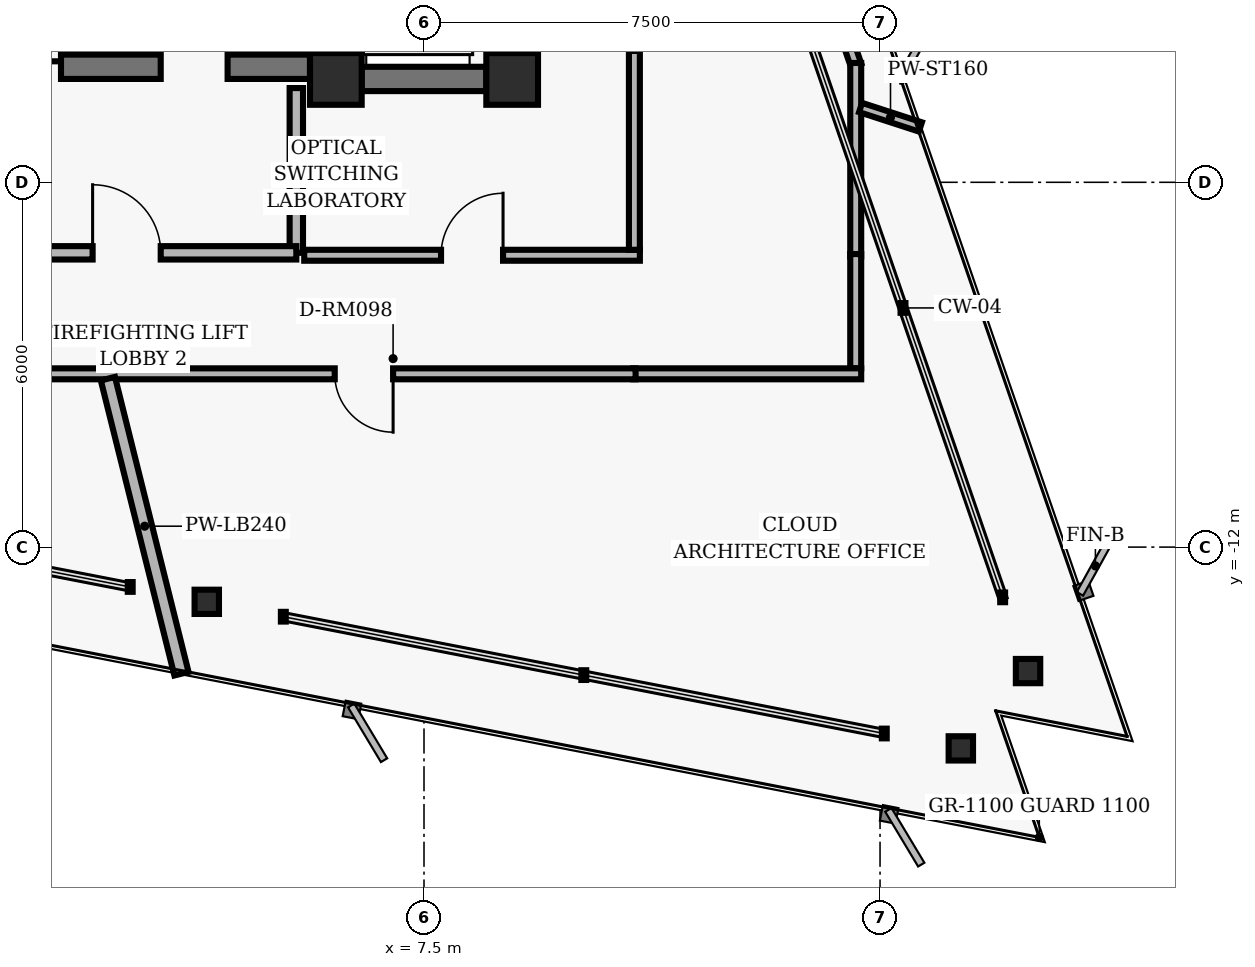
"""IFC4 building model, lengths in metres.
Left out: names, types, materials, properties, quantities, classifications, styles, units other than length and angle.
Written with IfcOpenShell. Run it as: python <this file> out.ifc"""

import sys

from ifc_helpers import new_model, si_unit, direction, frame, frame_2d, origin, origin_2d, place, context, subcontext, project, spatial, rectangle, hollow_rectangle, i_section, extrude, element, fill, save


model = new_model("IFC4")
c1 = context("Model", 3, precision=1e-05, world=origin(), true_north=direction((0.0, 1.0)))
c2 = subcontext(c1, "Body", "Model", "MODEL_VIEW")
j1 = project(units=[si_unit("LENGTHUNIT", "METRE"), si_unit("PLANEANGLEUNIT", "RADIAN")], contexts=[c1])
p1 = place(None, origin())
s1 = spatial("IfcSite", under=j1, at=p1, CompositionType="ELEMENT")
p2 = place(p1, origin())
s2 = spatial("IfcBuilding", under=s1, at=p2, CompositionType="ELEMENT")
p3 = place(p2, frame((0.0, 0.0, 150.24)))
s3 = spatial("IfcBuildingStorey", under=s2, at=p3, CompositionType="ELEMENT", Elevation=150.24)
for number, where, z_axis, x_axis in (
    (1, (6.05, -4.3, 0.0), (0.0, 0.0, 1.0), (1.0, 0.0, 0.0)),
    (2, (8.95, -4.3, 0.0), (0.0, 0.0, 1.0), (1.0, 0.0, 0.0)),
):
    element("IfcColumn", number, at=place(p3, frame(where, z_axis=z_axis, x_axis=x_axis)), inside=s3, PredefinedType="COLUMN", context=c2, shape_type="SweptSolid", body=[
        extrude(hollow_rectangle(XDim=0.85, YDim=0.85, WallThickness=0.055, InnerFilletRadius=0.02, OuterFilletRadius=0.04, at=origin_2d()), origin(), (0.0, 0.0, 1.0), 3.04),
    ])
p4 = place(p3, frame((6.05, -3.875, 0.0), z_axis=(0.0, 0.0, 1.0), x_axis=(0.0, 1.0, 0.0)))
e3 = element("IfcWall", 3, at=p4, inside=s3, PredefinedType="SHEAR", context=c2, shape_type="SweptSolid", body=[
    extrude(rectangle(XDim=3.45, YDim=0.6, at=frame_2d((1.725, 0.0))), origin(), (0.0, 0.0, 1.0), 2.788),
])
p5 = place(p3, frame((1.94, -4.1, 0.0), z_axis=(0.0, 0.0, 1.0), x_axis=(0.0, 1.0, 0.0)))
e4 = element("IfcWall", 4, at=p5, inside=s3, PredefinedType="SHEAR", context=c2, shape_type="SweptSolid", body=[
    extrude(rectangle(XDim=8.2, YDim=0.35, at=frame_2d((4.1, 0.0))), origin(), (0.0, 0.0, 1.0), 2.788),
])
p6 = place(p3, frame((-5.625, -4.1, 0.0), z_axis=(0.0, 0.0, 1.0), x_axis=(1.0, 0.0, 0.0)))
e5 = element("IfcWall", 5, at=p6, inside=s3, PredefinedType="SHEAR", context=c2, shape_type="SweptSolid", body=[
    extrude(rectangle(XDim=11.25, YDim=0.4, at=frame_2d((5.625, 0.0))), origin(), (0.0, 0.0, 1.0), 2.788),
])
p7 = place(p6, frame((1.355, 0.0, 0.0)))
e6 = element("IfcOpeningElement", 6, at=p7, cuts=e5, PredefinedType="OPENING", context=c2, shape_type="SweptSolid", body=[
    extrude(rectangle(XDim=1.1, YDim=2.04, at=frame_2d((0.55, 1.02))), frame((0.0, 0.21, 0.0), z_axis=(0.0, -1.0, 0.0), x_axis=(1.0, 0.0, 0.0)), (0.0, 0.0, 1.0), 0.42),
])
p8 = place(p6, frame((8.795, 0.0, 0.0)))
e7 = element("IfcOpeningElement", 7, at=p8, cuts=e5, PredefinedType="OPENING", context=c2, shape_type="SweptSolid", body=[
    extrude(rectangle(XDim=1.1, YDim=2.04, at=frame_2d((0.55, 1.02))), frame((0.0, 0.21, 0.0), z_axis=(0.0, -1.0, 0.0), x_axis=(1.0, 0.0, 0.0)), (0.0, 0.0, 1.0), 0.42),
])
p9 = place(p6, frame((4.095, 0.0, 0.0)))
e8 = element("IfcOpeningElement", 8, at=p9, cuts=e5, PredefinedType="OPENING", context=c2, shape_type="SweptSolid", body=[
    extrude(rectangle(XDim=1.06, YDim=2.04, at=frame_2d((0.53, 1.02))), frame((0.0, 0.21, 0.0), z_axis=(0.0, -1.0, 0.0), x_axis=(1.0, 0.0, 0.0)), (0.0, 0.0, 1.0), 0.42),
])
p10 = place(p6, frame((6.095, 0.0, 0.0)))
e9 = element("IfcOpeningElement", 9, at=p10, cuts=e5, PredefinedType="OPENING", context=c2, shape_type="SweptSolid", body=[
    extrude(rectangle(XDim=1.06, YDim=2.04, at=frame_2d((0.53, 1.02))), frame((0.0, 0.21, 0.0), z_axis=(0.0, -1.0, 0.0), x_axis=(1.0, 0.0, 0.0)), (0.0, 0.0, 1.0), 0.42),
])
p11 = place(p3, frame((8.95, -3.875, 0.0), z_axis=(0.0, 0.0, 1.0), x_axis=(0.0, 1.0, 0.0)))
e10 = element("IfcWall", 10, at=p11, inside=s3, PredefinedType="SHEAR", context=c2, shape_type="SweptSolid", body=[
    extrude(rectangle(XDim=7.95, YDim=0.6, at=frame_2d((3.975, 0.0))), origin(), (0.0, 0.0, 1.0), 2.788),
])
p12 = place(p11, frame((0.55, 0.0, 0.0)))
e11 = element("IfcOpeningElement", 11, at=p12, cuts=e10, PredefinedType="OPENING", context=c2, shape_type="SweptSolid", body=[
    extrude(rectangle(XDim=1.06, YDim=2.04, at=frame_2d((0.53, 1.02))), frame((0.0, 0.31, 0.0), z_axis=(0.0, -1.0, 0.0), x_axis=(1.0, 0.0, 0.0)), (0.0, 0.0, 1.0), 0.62),
])
p13 = place(p11, frame((3.445, 0.0, 0.0)))
e12 = element("IfcOpeningElement", 12, at=p13, cuts=e10, PredefinedType="OPENING", context=c2, shape_type="SweptSolid", body=[
    extrude(rectangle(XDim=1.06, YDim=2.04, at=frame_2d((0.53, 1.02))), frame((0.0, 0.31, 0.0), z_axis=(0.0, -1.0, 0.0), x_axis=(1.0, 0.0, 0.0)), (0.0, 0.0, 1.0), 0.62),
])
p14 = place(p11, frame((6.33, 0.0, 0.0)))
e13 = element("IfcOpeningElement", 13, at=p14, cuts=e10, PredefinedType="OPENING", context=c2, shape_type="SweptSolid", body=[
    extrude(rectangle(XDim=1.06, YDim=2.04, at=frame_2d((0.53, 1.02))), frame((0.0, 0.31, 0.0), z_axis=(0.0, -1.0, 0.0), x_axis=(1.0, 0.0, 0.0)), (0.0, 0.0, 1.0), 0.62),
])
p15 = place(p3, frame((6.475, -4.3, 0.0), z_axis=(0.0, 0.0, 1.0), x_axis=(1.0, 0.0, 0.0)))
e14 = element("IfcWall", 14, at=p15, inside=s3, PredefinedType="SHEAR", context=c2, shape_type="SweptSolid", body=[
    extrude(rectangle(XDim=2.05, YDim=0.4, at=frame_2d((1.025, 0.0))), origin(), (0.0, 0.0, 1.0), 2.788),
])
for number, where, z_axis, x_axis in (
    (15, (17.434, -14.039, 0.0), (0.0, 0.0, 1.0), (1.0, 0.0, 0.0)),
    (16, (3.927, -12.9, 0.0), (0.0, 0.0, 1.0), (1.0, 0.0, 0.0)),
    (17, (16.329, -15.311, 0.0), (0.0, 0.0, 1.0), (1.0, 0.0, 0.0)),
):
    element("IfcColumn", number, at=place(p3, frame(where, z_axis=z_axis, x_axis=x_axis)), inside=s3, PredefinedType="COLUMN", context=c2, shape_type="SweptSolid", body=[
        extrude(i_section(OverallWidth=0.401, OverallDepth=0.399, WebThickness=0.025, FlangeThickness=0.04, FilletRadius=0.018, at=origin_2d()), origin(), (0.0, 0.0, 1.0), 3.04),
    ])
p16 = place(p3, frame((5.4, -7.16, 0.0), z_axis=(0.0, 0.0, 1.0), x_axis=(0.0, 1.0, 0.0)))
e18 = element("IfcWall", 18, at=p16, inside=s3, PredefinedType="PARTITIONING", context=c2, shape_type="SweptSolid", body=[
    extrude(rectangle(XDim=2.71, YDim=0.22, at=frame_2d((1.355, 0.0))), origin(), (0.0, 0.0, 1.0), 2.763),
])
p17 = place(p3, frame((0.0, -7.16, 0.0), z_axis=(0.0, 0.0, 1.0), x_axis=(1.0, 0.0, 0.0)))
e19 = element("IfcWall", 19, at=p17, inside=s3, PredefinedType="PARTITIONING", context=c2, shape_type="SweptSolid", body=[
    extrude(rectangle(XDim=5.4, YDim=0.22, at=frame_2d((2.7, 0.0))), origin(), (0.0, 0.0, 1.0), 2.33),
])
p18 = place(p17, frame((2.05, 0.0, 0.0)))
e20 = element("IfcOpeningElement", 20, at=p18, cuts=e19, PredefinedType="OPENING", context=c2, shape_type="SweptSolid", body=[
    extrude(rectangle(XDim=1.12, YDim=2.02, at=frame_2d((0.56, 1.01))), frame((0.0, 0.12, 0.0), z_axis=(0.0, -1.0, 0.0), x_axis=(1.0, 0.0, 0.0)), (0.0, 0.0, 1.0), 0.24),
])
p19 = place(p3, frame((5.53, -7.2, 0.0), z_axis=(0.0, 0.0, 1.0), x_axis=(1.0, 0.0, 0.0)))
e21 = element("IfcWall", 21, at=p19, inside=s3, PredefinedType="PARTITIONING", context=c2, shape_type="SweptSolid", body=[
    extrude(rectangle(XDim=5.52, YDim=0.18, at=frame_2d((2.76, 0.0))), origin(), (0.0, 0.0, 1.0), 2.33),
])
p20 = place(p19, frame((2.25, 0.0, 0.0)))
e22 = element("IfcOpeningElement", 22, at=p20, cuts=e21, PredefinedType="OPENING", context=c2, shape_type="SweptSolid", body=[
    extrude(rectangle(XDim=1.02, YDim=2.02, at=frame_2d((0.51, 1.01))), frame((0.0, 0.1, 0.0), z_axis=(0.0, -1.0, 0.0), x_axis=(1.0, 0.0, 0.0)), (0.0, 0.0, 1.0), 0.2),
])
p21 = place(p3, frame((10.96, -7.11, 0.0), z_axis=(0.0, 0.0, 1.0), x_axis=(0.0, 1.0, 0.0)))
e23 = element("IfcWall", 23, at=p21, inside=s3, PredefinedType="PARTITIONING", context=c2, shape_type="SweptSolid", body=[
    extrude(rectangle(XDim=3.271, YDim=0.18, at=frame_2d((1.635, 0.0))), origin(), (0.0, 0.0, 1.0), 2.763),
])
p22 = place(p3, frame((10.954, 6.533, 0.0), z_axis=(0.0, 0.0, 1.0), x_axis=(0.325553439946, -0.945523642084, 0.0)))
e24 = element("IfcWall", 24, at=p22, inside=s3, PredefinedType="PARTITIONING", context=c2, shape_type="SweptSolid", body=[
    extrude(rectangle(XDim=11.22, YDim=0.18, at=frame_2d((5.61, 0.0))), origin(), (0.0, 0.0, 1.0), 2.763),
])
p23 = place(p3, frame((14.6, -4.038, 0.0), z_axis=(0.0, 0.0, 1.0), x_axis=(0.0, -1.0, 0.0)))
e25 = element("IfcWall", 25, at=p23, inside=s3, PredefinedType="PARTITIONING", context=c2, shape_type="SweptSolid", body=[
    extrude(rectangle(XDim=3.182, YDim=0.18, at=frame_2d((1.591, 0.0))), origin(), (0.0, 0.0, 1.0), 2.763),
])
p24 = place(p3, frame((14.6, -7.18, 0.0), z_axis=(0.0, 0.0, 1.0), x_axis=(0.0, -1.0, 0.0)))
e26 = element("IfcWall", 26, at=p24, inside=s3, PredefinedType="PARTITIONING", context=c2, shape_type="SweptSolid", body=[
    extrude(rectangle(XDim=1.88, YDim=0.18, at=frame_2d((0.94, 0.0))), origin(), (0.0, 0.0, 1.0), 2.763),
])
p25 = place(p3, frame((14.69, -9.15, 0.0), z_axis=(0.0, 0.0, 1.0), x_axis=(-1.0, 0.0, 0.0)))
e27 = element("IfcWall", 27, at=p25, inside=s3, PredefinedType="PARTITIONING", context=c2, shape_type="SweptSolid", body=[
    extrude(rectangle(XDim=3.75, YDim=0.18, at=frame_2d((1.875, 0.0))), origin(), (0.0, 0.0, 1.0), 2.763),
])
p26 = place(p3, frame((10.98, -9.15, 0.0), z_axis=(0.0, 0.0, 1.0), x_axis=(-1.0, 0.0, 0.0)))
e28 = element("IfcWall", 28, at=p26, inside=s3, PredefinedType="PARTITIONING", context=c2, shape_type="SweptSolid", body=[
    extrude(rectangle(XDim=17.5, YDim=0.18, at=frame_2d((8.75, 0.0))), origin(), (0.0, 0.0, 1.0), 2.33),
])
p27 = place(p26, frame((12.48, 0.0, 0.0)))
e29 = element("IfcOpeningElement", 29, at=p27, cuts=e28, PredefinedType="OPENING", context=c2, shape_type="SweptSolid", body=[
    extrude(rectangle(XDim=0.96, YDim=2.02, at=frame_2d((0.48, 1.01))), frame((0.0, 0.1, 0.0), z_axis=(0.0, -1.0, 0.0), x_axis=(1.0, 0.0, 0.0)), (0.0, 0.0, 1.0), 0.2),
])
p28 = place(p26, frame((3.988, 0.0, 0.0)))
e30 = element("IfcOpeningElement", 30, at=p28, cuts=e28, PredefinedType="OPENING", context=c2, shape_type="SweptSolid", body=[
    extrude(rectangle(XDim=0.96, YDim=2.02, at=frame_2d((0.48, 1.01))), frame((0.0, 0.1, 0.0), z_axis=(0.0, -1.0, 0.0), x_axis=(1.0, 0.0, 0.0)), (0.0, 0.0, 1.0), 0.2),
])
p29 = place(p3, frame((2.301, -9.23, 0.0), z_axis=(0.0, 0.0, 1.0), x_axis=(0.241903783585, -0.970300241929, 0.0)))
e31 = element("IfcWall", 31, at=p29, inside=s3, PredefinedType="PARTITIONING", context=c2, shape_type="SweptSolid", body=[
    extrude(rectangle(XDim=5.001, YDim=0.24, at=frame_2d((2.5, 0.0))), origin(), (0.0, 0.0, 1.0), 2.763),
])
p30 = place(p3, frame((14.68, -4.77, 0.0), z_axis=(0.0, 0.0, 1.0), x_axis=(0.951039270022, -0.309070067906, 0.0)))
e32 = element("IfcWall", 32, at=p30, inside=s3, PredefinedType="PARTITIONING", context=c2, shape_type="SweptSolid", body=[
    extrude(rectangle(XDim=1.035, YDim=0.16, at=frame_2d((0.518, 0.0))), origin(), (0.0, 0.0, 1.0), 2.763),
])
p31 = place(p8, origin())
e33 = element("IfcDoor", 33, at=p31, inside=s3, OperationType="SINGLE_SWING_LEFT", PredefinedType="DOOR", context=c2, shape_type="SweptSolid", body=[
    extrude(rectangle(XDim=1.1, YDim=2.04, at=frame_2d((0.55, 1.02))), frame((0.0, 0.025, 0.0), z_axis=(0.0, -1.0, 0.0), x_axis=(1.0, 0.0, 0.0)), (0.0, 0.0, 1.0), 0.05),
])
fill(e7, e33)
p32 = place(p10, origin())
e34 = element("IfcDoor", 34, at=p32, inside=s3, OperationType="SLIDING_TO_RIGHT", PredefinedType="DOOR", context=c2, shape_type="SweptSolid", body=[
    extrude(rectangle(XDim=1.06, YDim=2.04, at=frame_2d((0.53, 1.02))), frame((0.0, 0.025, 0.0), z_axis=(0.0, -1.0, 0.0), x_axis=(1.0, 0.0, 0.0)), (0.0, 0.0, 1.0), 0.05),
])
fill(e9, e34)
p33 = place(p18, origin())
e35 = element("IfcDoor", 35, at=p33, inside=s3, OperationType="SINGLE_SWING_LEFT", PredefinedType="DOOR", context=c2, shape_type="SweptSolid", body=[
    extrude(rectangle(XDim=1.12, YDim=2.02, at=frame_2d((0.56, 1.01))), frame((0.0, 0.025, 0.0), z_axis=(0.0, -1.0, 0.0), x_axis=(1.0, 0.0, 0.0)), (0.0, 0.0, 1.0), 0.05),
])
fill(e20, e35)
p34 = place(p28, origin())
e36 = element("IfcDoor", 36, at=p34, inside=s3, OperationType="SINGLE_SWING_LEFT", PredefinedType="DOOR", context=c2, shape_type="SweptSolid", body=[
    extrude(rectangle(XDim=0.96, YDim=2.02, at=frame_2d((0.48, 1.01))), frame((0.0, 0.025, 0.0), z_axis=(0.0, -1.0, 0.0), x_axis=(1.0, 0.0, 0.0)), (0.0, 0.0, 1.0), 0.05),
])
fill(e30, e36)
p35 = place(p20, origin())
e37 = element("IfcDoor", 37, at=p35, inside=s3, OperationType="SINGLE_SWING_RIGHT", PredefinedType="DOOR", context=c2, shape_type="SweptSolid", body=[
    extrude(rectangle(XDim=1.02, YDim=2.02, at=frame_2d((0.51, 1.01))), frame((0.0, 0.025, 0.0), z_axis=(0.0, -1.0, 0.0), x_axis=(1.0, 0.0, 0.0)), (0.0, 0.0, 1.0), 0.05),
])
fill(e22, e37)
save(model, sys.argv[1])
